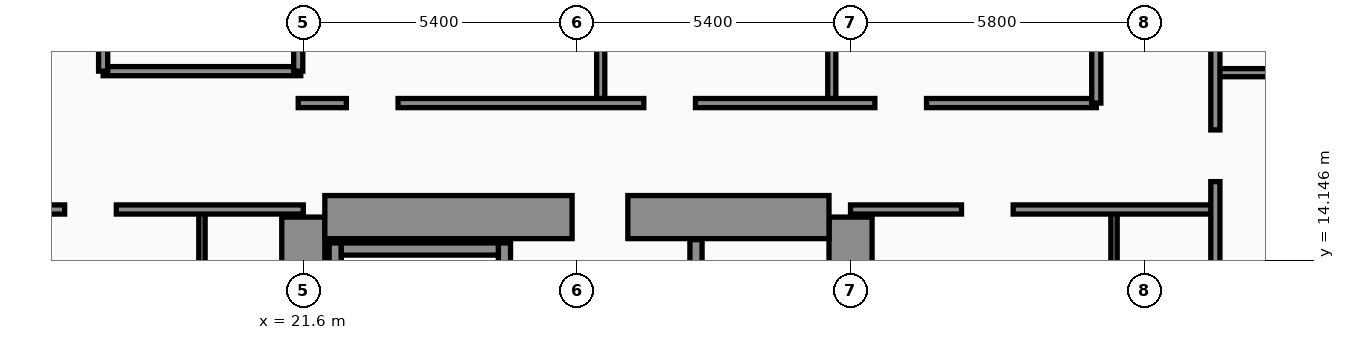
"""IFC4 building model, lengths in metres.
Left out: names, types, materials, properties, quantities, classifications, styles, units other than length and angle.
Written with IfcOpenShell. Run it as: python <this file> out.ifc"""

import sys

from ifc_helpers import new_model, si_unit, direction, frame, frame_2d, origin, place, context, subcontext, project, spatial, rectangle, extrude, element, fill, save


model = new_model("IFC4")
c1 = context("Model", 3, precision=1e-05, world=origin(), true_north=direction((0.0, 1.0)))
c2 = subcontext(c1, "Body", "Model", "MODEL_VIEW")
j1 = project(units=[si_unit("LENGTHUNIT", "METRE"), si_unit("PLANEANGLEUNIT", "RADIAN")], contexts=[c1])
p1 = place(None, origin())
s1 = spatial("IfcSite", under=j1, at=p1, CompositionType="ELEMENT")
p2 = place(p1, origin())
s2 = spatial("IfcBuilding", under=s1, at=p2, CompositionType="ELEMENT")
p3 = place(p2, frame((0.0, 0.0, 116.4)))
s3 = spatial("IfcBuildingStorey", under=s2, at=p3, CompositionType="ELEMENT", Elevation=116.4)
for number, where, z_axis, x_axis in (
    (1, (21.6, 4.6, 0.0), (0.0, 0.0, 1.0), (0.0, 1.0, 0.0)),
    (2, (32.4, 4.6, 0.0), (0.0, 0.0, 1.0), (0.0, 1.0, 0.0)),
):
    element("IfcWall", number, at=place(p3, frame(where, z_axis=z_axis, x_axis=x_axis)), inside=s3, PredefinedType="SHEAR", context=c2, shape_type="SweptSolid", body=[
        extrude(rectangle(XDim=10.4, YDim=0.85, at=frame_2d((5.2, 0.0))), origin(), (0.0, 0.0, 1.0), 3.56),
    ])
p4 = place(p3, frame((22.025, 15.0, 0.0), z_axis=(0.0, 0.0, 1.0), x_axis=(1.0, 0.0, 0.0)))
e3 = element("IfcWall", 3, at=p4, inside=s3, PredefinedType="SHEAR", context=c2, shape_type="SweptSolid", body=[
    extrude(rectangle(XDim=9.95, YDim=0.85, at=frame_2d((4.975, 0.0))), origin(), (0.0, 0.0, 1.0), 3.56),
])
p5 = place(p4, frame((4.88, 0.0, 0.0)))
e4 = element("IfcOpeningElement", 4, at=p5, cuts=e3, PredefinedType="OPENING", context=c2, shape_type="SweptSolid", body=[
    extrude(rectangle(XDim=1.1, YDim=2.2, at=frame_2d((0.55, 1.1))), frame((0.0, 0.435, 0.0), z_axis=(0.0, -1.0, 0.0), x_axis=(1.0, 0.0, 0.0)), (0.0, 0.0, 1.0), 0.87),
])
p6 = place(p3, frame((22.23, 5.025, 0.0), z_axis=(0.0, 0.0, 1.0), x_axis=(0.0, 1.0, 0.0)))
e5 = element("IfcWall", 5, at=p6, inside=s3, PredefinedType="SOLIDWALL", context=c2, shape_type="SweptSolid", body=[
    extrude(rectangle(XDim=9.465, YDim=0.24, at=frame_2d((4.732, 0.0))), origin(), (0.0, 0.0, 1.0), 3.56),
])
p7 = place(p3, frame((25.57, 5.025, 0.0), z_axis=(0.0, 0.0, 1.0), x_axis=(0.0, 1.0, 0.0)))
e6 = element("IfcWall", 6, at=p7, inside=s3, PredefinedType="SOLIDWALL", context=c2, shape_type="SweptSolid", body=[
    extrude(rectangle(XDim=9.465, YDim=0.24, at=frame_2d((4.732, 0.0))), origin(), (0.0, 0.0, 1.0), 3.56),
])
p8 = place(p7, frame((0.35, 0.0, 0.0)))
e7 = element("IfcOpeningElement", 7, at=p8, cuts=e6, PredefinedType="OPENING", context=c2, shape_type="SweptSolid", body=[
    extrude(rectangle(XDim=1.15, YDim=2.2, at=frame_2d((0.575, 1.1))), frame((0.0, 0.13, 0.0), z_axis=(0.0, -1.0, 0.0), x_axis=(1.0, 0.0, 0.0)), (0.0, 0.0, 1.0), 0.26),
])
p9 = place(p3, frame((22.35, 14.37, 0.0), z_axis=(0.0, 0.0, 1.0), x_axis=(1.0, 0.0, 0.0)))
e8 = element("IfcWall", 8, at=p9, inside=s3, PredefinedType="SOLIDWALL", context=c2, shape_type="SweptSolid", body=[
    extrude(rectangle(XDim=3.1, YDim=0.24, at=frame_2d((1.55, 0.0))), origin(), (0.0, 0.0, 1.0), 3.56),
])
p10 = place(p3, frame((29.35, 5.045, 0.0), z_axis=(0.0, 0.0, 1.0), x_axis=(0.0, 1.0, 0.0)))
e9 = element("IfcWall", 9, at=p10, inside=s3, PredefinedType="SOLIDWALL", context=c2, shape_type="SweptSolid", body=[
    extrude(rectangle(XDim=9.51, YDim=0.24, at=frame_2d((4.755, 0.0))), origin(), (0.0, 0.0, 1.0), 3.56),
])
p11 = place(p10, frame((0.55, 0.0, 0.0)))
e10 = element("IfcOpeningElement", 10, at=p11, cuts=e9, PredefinedType="OPENING", context=c2, shape_type="SweptSolid", body=[
    extrude(rectangle(XDim=1.3, YDim=2.35, at=frame_2d((0.65, 1.175))), frame((0.0, 0.13, 0.0), z_axis=(0.0, -1.0, 0.0), x_axis=(1.0, 0.0, 0.0)), (0.0, 0.0, 1.0), 0.26),
])
p12 = place(p3, frame((19.6, 2.44, 0.0), z_axis=(0.0, 0.0, 1.0), x_axis=(0.0, 1.0, 0.0)))
e11 = element("IfcWall", 11, at=p12, inside=s3, PredefinedType="PARTITIONING", context=c2, shape_type="SweptSolid", body=[
    extrude(rectangle(XDim=12.71, YDim=0.125, at=frame_2d((6.355, 0.0))), origin(), (0.0, 0.0, 1.0), 2.49),
])
p13 = place(p12, frame((4.34, 0.0, 0.0)))
e12 = element("IfcOpeningElement", 12, at=p13, cuts=e11, PredefinedType="OPENING", context=c2, shape_type="SweptSolid", body=[
    extrude(rectangle(XDim=0.96, YDim=2.2, at=frame_2d((0.48, 1.1))), frame((0.0, 0.073, 0.0), z_axis=(0.0, -1.0, 0.0), x_axis=(1.0, 0.0, 0.0)), (0.0, 0.0, 1.0), 0.145),
])
p14 = place(p12, frame((10.18, 0.0, 0.0)))
e13 = element("IfcOpeningElement", 13, at=p14, cuts=e11, PredefinedType="OPENING", context=c2, shape_type="SweptSolid", body=[
    extrude(rectangle(XDim=0.9, YDim=2.15, at=frame_2d((0.45, 1.075))), frame((0.0, 0.073, 0.0), z_axis=(0.0, -1.0, 0.0), x_axis=(1.0, 0.0, 0.0)), (0.0, 0.0, 1.0), 0.145),
])
p15 = place(p3, frame((15.15, 15.15, 0.0), z_axis=(0.0, 0.0, 1.0), x_axis=(1.0, 0.0, 0.0)))
e14 = element("IfcWall", 14, at=p15, inside=s3, PredefinedType="PARTITIONING", context=c2, shape_type="SweptSolid", body=[
    extrude(rectangle(XDim=6.45, YDim=0.18, at=frame_2d((3.225, 0.0))), origin(), (0.0, 0.0, 1.0), 2.49),
])
p16 = place(p15, frame((1.74, 0.0, 0.0)))
e15 = element("IfcOpeningElement", 15, at=p16, cuts=e14, PredefinedType="OPENING", context=c2, shape_type="SweptSolid", body=[
    extrude(rectangle(XDim=1.02, YDim=2.2, at=frame_2d((0.51, 1.1))), frame((0.0, 0.1, 0.0), z_axis=(0.0, -1.0, 0.0), x_axis=(1.0, 0.0, 0.0)), (0.0, 0.0, 1.0), 0.2),
])
p17 = place(p3, frame((17.65, 17.88, 0.0), z_axis=(0.0, 0.0, 1.0), x_axis=(1.0, 0.0, 0.0)))
e16 = element("IfcWall", 16, at=p17, inside=s3, PredefinedType="PARTITIONING", context=c2, shape_type="SweptSolid", body=[
    extrude(rectangle(XDim=3.9, YDim=0.18, at=frame_2d((1.95, 0.0))), origin(), (0.0, 0.0, 1.0), 3.56),
])
p18 = place(p3, frame((21.5, 17.88, 0.0), z_axis=(0.0, 0.0, 1.0), x_axis=(0.0, 1.0, 0.0)))
e17 = element("IfcWall", 17, at=p18, inside=s3, PredefinedType="PARTITIONING", context=c2, shape_type="SweptSolid", body=[
    extrude(rectangle(XDim=6.44, YDim=0.18, at=frame_2d((3.22, 0.0))), origin(), (0.0, 0.0, 1.0), 3.56),
])
p19 = place(p3, frame((17.65, 17.88, 0.0), z_axis=(0.0, 0.0, 1.0), x_axis=(0.0, 1.0, 0.0)))
e18 = element("IfcWall", 18, at=p19, inside=s3, PredefinedType="PARTITIONING", context=c2, shape_type="SweptSolid", body=[
    extrude(rectangle(XDim=6.44, YDim=0.18, at=frame_2d((3.22, 0.0))), origin(), (0.0, 0.0, 1.0), 3.56),
])
p20 = place(p19, frame((0.65, 0.0, 0.0)))
e19 = element("IfcOpeningElement", 19, at=p20, cuts=e18, PredefinedType="OPENING", context=c2, shape_type="SweptSolid", body=[
    extrude(rectangle(XDim=0.98, YDim=2.15, at=frame_2d((0.49, 1.075))), frame((0.0, 0.1, 0.0), z_axis=(0.0, -1.0, 0.0), x_axis=(1.0, 0.0, 0.0)), (0.0, 0.0, 1.0), 0.2),
])
p21 = place(p19, frame((3.97, 0.0, 0.0)))
e20 = element("IfcOpeningElement", 20, at=p21, cuts=e18, PredefinedType="OPENING", context=c2, shape_type="SweptSolid", body=[
    extrude(rectangle(XDim=0.96, YDim=2.2, at=frame_2d((0.48, 1.1))), frame((0.0, 0.1, 0.0), z_axis=(0.0, -1.0, 0.0), x_axis=(1.0, 0.0, 0.0)), (0.0, 0.0, 1.0), 0.2),
])
p22 = place(p3, frame((37.6, 2.44, 0.0), z_axis=(0.0, 0.0, 1.0), x_axis=(0.0, 1.0, 0.0)))
e21 = element("IfcWall", 21, at=p22, inside=s3, PredefinedType="PARTITIONING", context=c2, shape_type="SweptSolid", body=[
    extrude(rectangle(XDim=12.71, YDim=0.125, at=frame_2d((6.355, 0.0))), origin(), (0.0, 0.0, 1.0), 2.84),
])
p23 = place(p22, frame((4.35, 0.0, 0.0)))
e22 = element("IfcOpeningElement", 22, at=p23, cuts=e21, PredefinedType="OPENING", context=c2, shape_type="SweptSolid", body=[
    extrude(rectangle(XDim=0.96, YDim=2.2, at=frame_2d((0.48, 1.1))), frame((0.0, 0.073, 0.0), z_axis=(0.0, -1.0, 0.0), x_axis=(1.0, 0.0, 0.0)), (0.0, 0.0, 1.0), 0.145),
])
p24 = place(p22, frame((10.21, 0.0, 0.0)))
e23 = element("IfcOpeningElement", 23, at=p24, cuts=e21, PredefinedType="OPENING", context=c2, shape_type="SweptSolid", body=[
    extrude(rectangle(XDim=0.9, YDim=2.15, at=frame_2d((0.45, 1.075))), frame((0.0, 0.073, 0.0), z_axis=(0.0, -1.0, 0.0), x_axis=(1.0, 0.0, 0.0)), (0.0, 0.0, 1.0), 0.145),
])
p25 = place(p3, frame((32.4, 15.15, 0.0), z_axis=(0.0, 0.0, 1.0), x_axis=(1.0, 0.0, 0.0)))
e24 = element("IfcWall", 24, at=p25, inside=s3, PredefinedType="PARTITIONING", context=c2, shape_type="SweptSolid", body=[
    extrude(rectangle(XDim=7.2, YDim=0.18, at=frame_2d((3.6, 0.0))), origin(), (0.0, 0.0, 1.0), 2.84),
])
p26 = place(p25, frame((2.19, 0.0, 0.0)))
e25 = element("IfcOpeningElement", 25, at=p26, cuts=e24, PredefinedType="OPENING", context=c2, shape_type="SweptSolid", body=[
    extrude(rectangle(XDim=1.02, YDim=2.2, at=frame_2d((0.51, 1.1))), frame((0.0, 0.1, 0.0), z_axis=(0.0, -1.0, 0.0), x_axis=(1.0, 0.0, 0.0)), (0.0, 0.0, 1.0), 0.2),
])
p27 = place(p3, frame((27.47, 17.25, 0.0), z_axis=(0.0, 0.0, 1.0), x_axis=(0.0, 1.0, 0.0)))
e26 = element("IfcWall", 26, at=p27, inside=s3, PredefinedType="PARTITIONING", context=c2, shape_type="SweptSolid", body=[
    extrude(rectangle(XDim=10.5, YDim=0.16, at=frame_2d((5.25, 0.0))), origin(), (0.0, 0.0, 1.0), 2.84),
])
p28 = place(p3, frame((32.03, 17.25, 0.0), z_axis=(0.0, 0.0, 1.0), x_axis=(0.0, 1.0, 0.0)))
e27 = element("IfcWall", 27, at=p28, inside=s3, PredefinedType="PARTITIONING", context=c2, shape_type="SweptSolid", body=[
    extrude(rectangle(XDim=13.04, YDim=0.16, at=frame_2d((6.52, 0.0))), origin(), (0.0, 0.0, 1.0), 2.84),
])
p29 = place(p3, frame((21.5, 17.25, 0.0), z_axis=(0.0, 0.0, 1.0), x_axis=(1.0, 0.0, 0.0)))
e28 = element("IfcWall", 28, at=p29, inside=s3, PredefinedType="PARTITIONING", context=c2, shape_type="SweptSolid", body=[
    extrude(rectangle(XDim=15.75, YDim=0.18, at=frame_2d((7.875, 0.0))), origin(), (0.0, 0.0, 1.0), 2.84),
])
p30 = place(p29, frame((0.95, 0.0, 0.0)))
e29 = element("IfcOpeningElement", 29, at=p30, cuts=e28, PredefinedType="OPENING", context=c2, shape_type="SweptSolid", body=[
    extrude(rectangle(XDim=1.02, YDim=2.2, at=frame_2d((0.51, 1.1))), frame((0.0, 0.1, 0.0), z_axis=(0.0, -1.0, 0.0), x_axis=(1.0, 0.0, 0.0)), (0.0, 0.0, 1.0), 0.2),
])
p31 = place(p29, frame((6.82, 0.0, 0.0)))
e30 = element("IfcOpeningElement", 30, at=p31, cuts=e28, PredefinedType="OPENING", context=c2, shape_type="SweptSolid", body=[
    extrude(rectangle(XDim=1.02, YDim=2.2, at=frame_2d((0.51, 1.1))), frame((0.0, 0.1, 0.0), z_axis=(0.0, -1.0, 0.0), x_axis=(1.0, 0.0, 0.0)), (0.0, 0.0, 1.0), 0.2),
])
p32 = place(p29, frame((11.38, 0.0, 0.0)))
e31 = element("IfcOpeningElement", 31, at=p32, cuts=e28, PredefinedType="OPENING", context=c2, shape_type="SweptSolid", body=[
    extrude(rectangle(XDim=1.02, YDim=2.2, at=frame_2d((0.51, 1.1))), frame((0.0, 0.1, 0.0), z_axis=(0.0, -1.0, 0.0), x_axis=(1.0, 0.0, 0.0)), (0.0, 0.0, 1.0), 0.2),
])
p33 = place(p3, frame((37.25, 17.25, 0.0), z_axis=(0.0, 0.0, 1.0), x_axis=(0.0, 1.0, 0.0)))
e32 = element("IfcWall", 32, at=p33, inside=s3, PredefinedType="PARTITIONING", context=c2, shape_type="SweptSolid", body=[
    extrude(rectangle(XDim=15.95, YDim=0.18, at=frame_2d((7.975, 0.0))), origin(), (0.0, 0.0, 1.0), 2.84),
])
p34 = place(p3, frame((39.6, 17.85, 0.0), z_axis=(0.0, 0.0, 1.0), x_axis=(1.0, 0.0, 0.0)))
e33 = element("IfcWall", 33, at=p34, inside=s3, PredefinedType="PARTITIONING", context=c2, shape_type="SweptSolid", body=[
    extrude(rectangle(XDim=15.68, YDim=0.16, at=frame_2d((7.84, 0.0))), origin(), (0.0, 0.0, 1.0), 2.84),
])
p35 = place(p3, frame((39.6, 2.44, 0.0), z_axis=(0.0, 0.0, 1.0), x_axis=(0.0, 1.0, 0.0)))
e34 = element("IfcWall", 34, at=p35, inside=s3, PredefinedType="PARTITIONING", context=c2, shape_type="SweptSolid", body=[
    extrude(rectangle(XDim=31.04, YDim=0.18, at=frame_2d((15.52, 0.0))), origin(), (0.0, 0.0, 1.0), 2.84),
])
p36 = place(p35, frame((13.26, 0.0, 0.0)))
e35 = element("IfcOpeningElement", 35, at=p36, cuts=e34, PredefinedType="OPENING", context=c2, shape_type="SweptSolid", body=[
    extrude(rectangle(XDim=1.02, YDim=2.2, at=frame_2d((0.51, 1.1))), frame((0.0, 0.1, 0.0), z_axis=(0.0, -1.0, 0.0), x_axis=(1.0, 0.0, 0.0)), (0.0, 0.0, 1.0), 0.2),
])
p37 = place(p35, frame((17.77, 0.0, 0.0)))
e36 = element("IfcOpeningElement", 36, at=p37, cuts=e34, PredefinedType="OPENING", context=c2, shape_type="SweptSolid", body=[
    extrude(rectangle(XDim=1.02, YDim=2.2, at=frame_2d((0.51, 1.1))), frame((0.0, 0.1, 0.0), z_axis=(0.0, -1.0, 0.0), x_axis=(1.0, 0.0, 0.0)), (0.0, 0.0, 1.0), 0.2),
])
p38 = place(p35, frame((25.58, 0.0, 0.0)))
e37 = element("IfcOpeningElement", 37, at=p38, cuts=e34, PredefinedType="OPENING", context=c2, shape_type="SweptSolid", body=[
    extrude(rectangle(XDim=1.02, YDim=2.2, at=frame_2d((0.51, 1.1))), frame((0.0, 0.1, 0.0), z_axis=(0.0, -1.0, 0.0), x_axis=(1.0, 0.0, 0.0)), (0.0, 0.0, 1.0), 0.2),
])
p39 = place(p16, origin())
e38 = element("IfcDoor", 38, at=p39, inside=s3, OperationType="SINGLE_SWING_LEFT", PredefinedType="DOOR", context=c2, shape_type="SweptSolid", body=[
    extrude(rectangle(XDim=1.02, YDim=2.2, at=frame_2d((0.51, 1.1))), frame((0.0, 0.025, 0.0), z_axis=(0.0, -1.0, 0.0), x_axis=(1.0, 0.0, 0.0)), (0.0, 0.0, 1.0), 0.05),
])
fill(e15, e38)
p40 = place(p26, origin())
e39 = element("IfcDoor", 39, at=p40, inside=s3, OperationType="SINGLE_SWING_LEFT", PredefinedType="DOOR", context=c2, shape_type="SweptSolid", body=[
    extrude(rectangle(XDim=1.02, YDim=2.2, at=frame_2d((0.51, 1.1))), frame((0.0, 0.025, 0.0), z_axis=(0.0, -1.0, 0.0), x_axis=(1.0, 0.0, 0.0)), (0.0, 0.0, 1.0), 0.05),
])
fill(e25, e39)
p41 = place(p30, origin())
e40 = element("IfcDoor", 40, at=p41, inside=s3, OperationType="SINGLE_SWING_RIGHT", PredefinedType="DOOR", context=c2, shape_type="SweptSolid", body=[
    extrude(rectangle(XDim=1.02, YDim=2.2, at=frame_2d((0.51, 1.1))), frame((0.0, 0.025, 0.0), z_axis=(0.0, -1.0, 0.0), x_axis=(1.0, 0.0, 0.0)), (0.0, 0.0, 1.0), 0.05),
])
fill(e29, e40)
p42 = place(p31, origin())
e41 = element("IfcDoor", 41, at=p42, inside=s3, OperationType="SINGLE_SWING_LEFT", PredefinedType="DOOR", context=c2, shape_type="SweptSolid", body=[
    extrude(rectangle(XDim=1.02, YDim=2.2, at=frame_2d((0.51, 1.1))), frame((0.0, 0.025, 0.0), z_axis=(0.0, -1.0, 0.0), x_axis=(1.0, 0.0, 0.0)), (0.0, 0.0, 1.0), 0.05),
])
fill(e30, e41)
p43 = place(p32, origin())
e42 = element("IfcDoor", 42, at=p43, inside=s3, OperationType="SINGLE_SWING_RIGHT", PredefinedType="DOOR", context=c2, shape_type="SweptSolid", body=[
    extrude(rectangle(XDim=1.02, YDim=2.2, at=frame_2d((0.51, 1.1))), frame((0.0, 0.025, 0.0), z_axis=(0.0, -1.0, 0.0), x_axis=(1.0, 0.0, 0.0)), (0.0, 0.0, 1.0), 0.05),
])
fill(e31, e42)
p44 = place(p36, origin())
e43 = element("IfcDoor", 43, at=p44, inside=s3, OperationType="SINGLE_SWING_LEFT", PredefinedType="DOOR", context=c2, shape_type="SweptSolid", body=[
    extrude(rectangle(XDim=1.02, YDim=2.2, at=frame_2d((0.51, 1.1))), frame((0.0, 0.025, 0.0), z_axis=(0.0, -1.0, 0.0), x_axis=(1.0, 0.0, 0.0)), (0.0, 0.0, 1.0), 0.05),
])
fill(e35, e43)
p45 = place(p5, origin())
e44 = element("IfcDoor", 44, at=p45, inside=s3, OperationType="SINGLE_SWING_RIGHT", PredefinedType="DOOR", context=c2, shape_type="SweptSolid", body=[
    extrude(rectangle(XDim=1.1, YDim=2.2, at=frame_2d((0.55, 1.1))), frame((0.0, 0.025, 0.0), z_axis=(0.0, -1.0, 0.0), x_axis=(1.0, 0.0, 0.0)), (0.0, 0.0, 1.0), 0.05),
])
fill(e4, e44)
save(model, sys.argv[1])
